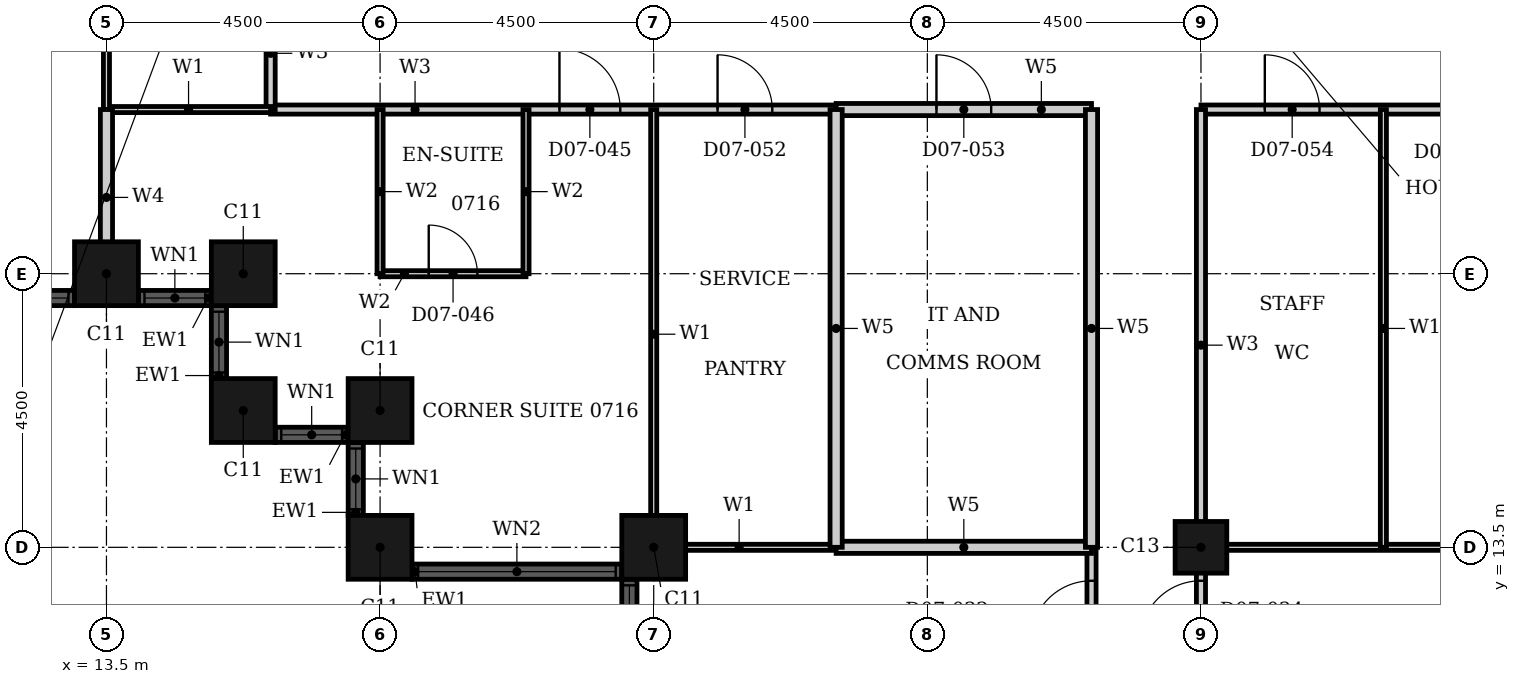
"""IFC4 building model, lengths in metres.
Left out: names, types, materials, properties, quantities, classifications, styles, units other than length and angle.
Written with IfcOpenShell. Run it as: python <this file> out.ifc"""

import sys

from ifc_helpers import new_model, si_unit, direction, frame, frame_2d, origin, origin_2d, place, context, subcontext, project, spatial, rectangle, hollow_rectangle, extrude, element, fill, save


model = new_model("IFC4")
c1 = context("Model", 3, precision=1e-05, world=origin(), true_north=direction((0.0, 1.0)))
c2 = subcontext(c1, "Body", "Model", "MODEL_VIEW")
j1 = project(units=[si_unit("LENGTHUNIT", "METRE"), si_unit("PLANEANGLEUNIT", "RADIAN")], contexts=[c1])
p1 = place(None, origin())
s1 = spatial("IfcSite", under=j1, at=p1, CompositionType="ELEMENT")
p2 = place(p1, origin())
s2 = spatial("IfcBuilding", under=s1, at=p2, CompositionType="ELEMENT")
p3 = place(p2, frame((0.0, 0.0, 37.2)))
s3 = spatial("IfcBuildingStorey", under=s2, at=p3, CompositionType="ELEMENT", Elevation=37.2)
for number, where, z_axis, x_axis in (
    (1, (13.5, 18.0, 0.0), (0.0, 0.0, 1.0), (1.0, 0.0, 0.0)),
    (2, (15.75, 18.0, 0.0), (0.0, 0.0, 1.0), (1.0, 0.0, 0.0)),
    (3, (15.75, 15.75, 0.0), (0.0, 0.0, 1.0), (1.0, 0.0, 0.0)),
    (4, (18.0, 15.75, 0.0), (0.0, 0.0, 1.0), (1.0, 0.0, 0.0)),
    (5, (18.0, 13.5, 0.0), (0.0, 0.0, 1.0), (1.0, 0.0, 0.0)),
    (6, (22.5, 13.5, 0.0), (0.0, 0.0, 1.0), (1.0, 0.0, 0.0)),
):
    element("IfcColumn", number, at=place(p3, frame(where, z_axis=z_axis, x_axis=x_axis)), inside=s3, PredefinedType="COLUMN", context=c2, shape_type="SweptSolid", body=[
        extrude(hollow_rectangle(XDim=1.05, YDim=1.05, WallThickness=0.034, at=origin_2d()), origin(), (0.0, 0.0, 1.0), 3.6),
    ])
p4 = place(p3, frame((31.5, 13.5, 0.0), z_axis=(0.0, 0.0, 1.0), x_axis=(1.0, 0.0, 0.0)))
e7 = element("IfcColumn", 7, at=p4, inside=s3, PredefinedType="COLUMN", context=c2, shape_type="SweptSolid", body=[
    extrude(hollow_rectangle(XDim=0.85, YDim=0.85, WallThickness=0.026, at=origin_2d()), origin(), (0.0, 0.0, 1.0), 3.6),
])
p5 = place(p3, frame((5.025, 17.6, 0.0), z_axis=(0.0, 0.0, 1.0), x_axis=(1.0, 0.0, 0.0)))
e8 = element("IfcWall", 8, at=p5, inside=s3, PredefinedType="SOLIDWALL", context=c2, shape_type="SweptSolid", body=[
    extrude(rectangle(XDim=7.95, YDim=0.25, at=frame_2d((3.975, 0.0))), origin(), (0.0, 0.0, 1.0), 3.6),
])
p6 = place(p5, frame((0.1, 0.0, 0.9)))
e9 = element("IfcOpeningElement", 9, at=p6, cuts=e8, PredefinedType="OPENING", context=c2, shape_type="SweptSolid", body=[
    extrude(rectangle(XDim=3.25, YDim=2.08, at=frame_2d((1.625, 1.04))), frame((0.0, 0.135, 0.0), z_axis=(0.0, -1.0, 0.0), x_axis=(1.0, 0.0, 0.0)), (0.0, 0.0, 1.0), 0.27),
])
p7 = place(p5, frame((4.6, 0.0, 0.9)))
e10 = element("IfcOpeningElement", 10, at=p7, cuts=e8, PredefinedType="OPENING", context=c2, shape_type="SweptSolid", body=[
    extrude(rectangle(XDim=3.25, YDim=2.08, at=frame_2d((1.625, 1.04))), frame((0.0, 0.135, 0.0), z_axis=(0.0, -1.0, 0.0), x_axis=(1.0, 0.0, 0.0)), (0.0, 0.0, 1.0), 0.27),
])
p8 = place(p3, frame((14.025, 17.6, 0.0), z_axis=(0.0, 0.0, 1.0), x_axis=(1.0, 0.0, 0.0)))
e11 = element("IfcWall", 11, at=p8, inside=s3, PredefinedType="SOLIDWALL", context=c2, shape_type="SweptSolid", body=[
    extrude(rectangle(XDim=1.2, YDim=0.25, at=frame_2d((0.6, 0.0))), origin(), (0.0, 0.0, 1.0), 3.6),
])
p9 = place(p8, frame((0.1, 0.0, 0.9)))
e12 = element("IfcOpeningElement", 12, at=p9, cuts=e11, PredefinedType="OPENING", context=c2, shape_type="SweptSolid", body=[
    extrude(rectangle(XDim=1.0, YDim=2.08, at=frame_2d((0.5, 1.04))), frame((0.0, 0.135, 0.0), z_axis=(0.0, -1.0, 0.0), x_axis=(1.0, 0.0, 0.0)), (0.0, 0.0, 1.0), 0.27),
])
p10 = place(p3, frame((15.35, 17.475, 0.0), z_axis=(0.0, 0.0, 1.0), x_axis=(0.0, -1.0, 0.0)))
e13 = element("IfcWall", 13, at=p10, inside=s3, PredefinedType="SOLIDWALL", context=c2, shape_type="SweptSolid", body=[
    extrude(rectangle(XDim=1.2, YDim=0.25, at=frame_2d((0.6, 0.0))), origin(), (0.0, 0.0, 1.0), 3.6),
])
p11 = place(p10, frame((0.1, 0.0, 0.9)))
e14 = element("IfcOpeningElement", 14, at=p11, cuts=e13, PredefinedType="OPENING", context=c2, shape_type="SweptSolid", body=[
    extrude(rectangle(XDim=1.0, YDim=2.08, at=frame_2d((0.5, 1.04))), frame((0.0, 0.135, 0.0), z_axis=(0.0, -1.0, 0.0), x_axis=(1.0, 0.0, 0.0)), (0.0, 0.0, 1.0), 0.27),
])
p12 = place(p3, frame((16.275, 15.35, 0.0), z_axis=(0.0, 0.0, 1.0), x_axis=(1.0, 0.0, 0.0)))
e15 = element("IfcWall", 15, at=p12, inside=s3, PredefinedType="SOLIDWALL", context=c2, shape_type="SweptSolid", body=[
    extrude(rectangle(XDim=1.2, YDim=0.25, at=frame_2d((0.6, 0.0))), origin(), (0.0, 0.0, 1.0), 3.6),
])
p13 = place(p12, frame((0.1, 0.0, 0.9)))
e16 = element("IfcOpeningElement", 16, at=p13, cuts=e15, PredefinedType="OPENING", context=c2, shape_type="SweptSolid", body=[
    extrude(rectangle(XDim=1.0, YDim=2.08, at=frame_2d((0.5, 1.04))), frame((0.0, 0.135, 0.0), z_axis=(0.0, -1.0, 0.0), x_axis=(1.0, 0.0, 0.0)), (0.0, 0.0, 1.0), 0.27),
])
p14 = place(p3, frame((17.6, 15.225, 0.0), z_axis=(0.0, 0.0, 1.0), x_axis=(0.0, -1.0, 0.0)))
e17 = element("IfcWall", 17, at=p14, inside=s3, PredefinedType="SOLIDWALL", context=c2, shape_type="SweptSolid", body=[
    extrude(rectangle(XDim=1.2, YDim=0.25, at=frame_2d((0.6, 0.0))), origin(), (0.0, 0.0, 1.0), 3.6),
])
p15 = place(p14, frame((0.1, 0.0, 0.9)))
e18 = element("IfcOpeningElement", 18, at=p15, cuts=e17, PredefinedType="OPENING", context=c2, shape_type="SweptSolid", body=[
    extrude(rectangle(XDim=1.0, YDim=2.08, at=frame_2d((0.5, 1.04))), frame((0.0, 0.135, 0.0), z_axis=(0.0, -1.0, 0.0), x_axis=(1.0, 0.0, 0.0)), (0.0, 0.0, 1.0), 0.27),
])
p16 = place(p3, frame((18.525, 13.1, 0.0), z_axis=(0.0, 0.0, 1.0), x_axis=(1.0, 0.0, 0.0)))
e19 = element("IfcWall", 19, at=p16, inside=s3, PredefinedType="SOLIDWALL", context=c2, shape_type="SweptSolid", body=[
    extrude(rectangle(XDim=3.45, YDim=0.25, at=frame_2d((1.725, 0.0))), origin(), (0.0, 0.0, 1.0), 3.6),
])
p17 = place(p16, frame((0.1, 0.0, 0.9)))
e20 = element("IfcOpeningElement", 20, at=p17, cuts=e19, PredefinedType="OPENING", context=c2, shape_type="SweptSolid", body=[
    extrude(rectangle(XDim=3.25, YDim=2.08, at=frame_2d((1.625, 1.04))), frame((0.0, 0.135, 0.0), z_axis=(0.0, -1.0, 0.0), x_axis=(1.0, 0.0, 0.0)), (0.0, 0.0, 1.0), 0.27),
])
p18 = place(p3, frame((22.1, 12.975, 0.0), z_axis=(0.0, 0.0, 1.0), x_axis=(0.0, -1.0, 0.0)))
e21 = element("IfcWall", 21, at=p18, inside=s3, PredefinedType="SOLIDWALL", context=c2, shape_type="SweptSolid", body=[
    extrude(rectangle(XDim=7.95, YDim=0.25, at=frame_2d((3.975, 0.0))), origin(), (0.0, 0.0, 1.0), 3.6),
])
p19 = place(p18, frame((0.1, 0.0, 0.9)))
e22 = element("IfcOpeningElement", 22, at=p19, cuts=e21, PredefinedType="OPENING", context=c2, shape_type="SweptSolid", body=[
    extrude(rectangle(XDim=3.25, YDim=2.08, at=frame_2d((1.625, 1.04))), frame((0.0, 0.135, 0.0), z_axis=(0.0, -1.0, 0.0), x_axis=(1.0, 0.0, 0.0)), (0.0, 0.0, 1.0), 0.27),
])
p20 = place(p18, frame((4.6, 0.0, 0.9)))
e23 = element("IfcOpeningElement", 23, at=p20, cuts=e21, PredefinedType="OPENING", context=c2, shape_type="SweptSolid", body=[
    extrude(rectangle(XDim=3.25, YDim=2.08, at=frame_2d((1.625, 1.04))), frame((0.0, 0.135, 0.0), z_axis=(0.0, -1.0, 0.0), x_axis=(1.0, 0.0, 0.0)), (0.0, 0.0, 1.0), 0.27),
])
p21 = place(p3, frame((16.2, 20.7, 0.0), z_axis=(0.0, 0.0, 1.0), x_axis=(1.0, 0.0, 0.0)))
e24 = element("IfcWall", 24, at=p21, inside=s3, PredefinedType="PARTITIONING", context=c2, shape_type="SweptSolid", body=[
    extrude(rectangle(XDim=9.3, YDim=0.15, at=frame_2d((4.65, 0.0))), origin(), (0.0, 0.0, 1.0), 3.3),
])
p22 = place(p21, frame((4.75, 0.0, 0.0)))
e25 = element("IfcOpeningElement", 25, at=p22, cuts=e24, PredefinedType="OPENING", context=c2, shape_type="SweptSolid", body=[
    extrude(rectangle(XDim=1.0, YDim=2.1, at=frame_2d((0.5, 1.05))), frame((0.0, 0.085, 0.0), z_axis=(0.0, -1.0, 0.0), x_axis=(1.0, 0.0, 0.0)), (0.0, 0.0, 1.0), 0.17),
])
p23 = place(p21, frame((7.35, 0.0, 0.0)))
e26 = element("IfcOpeningElement", 26, at=p23, cuts=e24, PredefinedType="OPENING", context=c2, shape_type="SweptSolid", body=[
    extrude(rectangle(XDim=0.9, YDim=2.1, at=frame_2d((0.45, 1.05))), frame((0.0, 0.085, 0.0), z_axis=(0.0, -1.0, 0.0), x_axis=(1.0, 0.0, 0.0)), (0.0, 0.0, 1.0), 0.17),
])
p24 = place(p3, frame((31.5, 20.7, 0.0), z_axis=(0.0, 0.0, 1.0), x_axis=(1.0, 0.0, 0.0)))
e27 = element("IfcWall", 27, at=p24, inside=s3, PredefinedType="PARTITIONING", context=c2, shape_type="SweptSolid", body=[
    extrude(rectangle(XDim=15.3, YDim=0.15, at=frame_2d((7.65, 0.0))), origin(), (0.0, 0.0, 1.0), 3.3),
])
p25 = place(p24, frame((11.95, 0.0, 0.0)))
e28 = element("IfcOpeningElement", 28, at=p25, cuts=e27, PredefinedType="OPENING", context=c2, shape_type="SweptSolid", body=[
    extrude(rectangle(XDim=1.0, YDim=2.1, at=frame_2d((0.5, 1.05))), frame((0.0, 0.085, 0.0), z_axis=(0.0, -1.0, 0.0), x_axis=(1.0, 0.0, 0.0)), (0.0, 0.0, 1.0), 0.17),
])
p26 = place(p24, frame((1.05, 0.0, 0.0)))
e29 = element("IfcOpeningElement", 29, at=p26, cuts=e27, PredefinedType="OPENING", context=c2, shape_type="SweptSolid", body=[
    extrude(rectangle(XDim=0.9, YDim=2.1, at=frame_2d((0.45, 1.05))), frame((0.0, 0.085, 0.0), z_axis=(0.0, -1.0, 0.0), x_axis=(1.0, 0.0, 0.0)), (0.0, 0.0, 1.0), 0.17),
])
p27 = place(p24, frame((5.55, 0.0, 0.0)))
e30 = element("IfcOpeningElement", 30, at=p27, cuts=e27, PredefinedType="OPENING", context=c2, shape_type="SweptSolid", body=[
    extrude(rectangle(XDim=0.9, YDim=2.1, at=frame_2d((0.45, 1.05))), frame((0.0, 0.085, 0.0), z_axis=(0.0, -1.0, 0.0), x_axis=(1.0, 0.0, 0.0)), (0.0, 0.0, 1.0), 0.17),
])
p28 = place(p3, frame((16.2, 20.7, 0.0), z_axis=(0.0, 0.0, 1.0), x_axis=(0.0, 1.0, 0.0)))
e31 = element("IfcWall", 31, at=p28, inside=s3, PredefinedType="PARTITIONING", context=c2, shape_type="SweptSolid", body=[
    extrude(rectangle(XDim=4.5, YDim=0.15, at=frame_2d((2.25, 0.0))), origin(), (0.0, 0.0, 1.0), 3.3),
])
p29 = place(p28, frame((1.85, 0.0, 0.0)))
e32 = element("IfcOpeningElement", 32, at=p29, cuts=e31, PredefinedType="OPENING", context=c2, shape_type="SweptSolid", body=[
    extrude(rectangle(XDim=0.9, YDim=2.1, at=frame_2d((0.45, 1.05))), frame((0.0, 0.085, 0.0), z_axis=(0.0, -1.0, 0.0), x_axis=(1.0, 0.0, 0.0)), (0.0, 0.0, 1.0), 0.17),
])
p30 = place(p3, frame((29.7, 9.0, 0.0), z_axis=(0.0, 0.0, 1.0), x_axis=(0.0, 1.0, 0.0)))
e33 = element("IfcWall", 33, at=p30, inside=s3, PredefinedType="PARTITIONING", context=c2, shape_type="SweptSolid", body=[
    extrude(rectangle(XDim=4.5, YDim=0.15, at=frame_2d((2.25, 0.0))), origin(), (0.0, 0.0, 1.0), 3.3),
])
p31 = place(p30, frame((2.95, 0.0, 0.0)))
e34 = element("IfcOpeningElement", 34, at=p31, cuts=e33, PredefinedType="OPENING", context=c2, shape_type="SweptSolid", body=[
    extrude(rectangle(XDim=1.0, YDim=2.1, at=frame_2d((0.5, 1.05))), frame((0.0, 0.085, 0.0), z_axis=(0.0, -1.0, 0.0), x_axis=(1.0, 0.0, 0.0)), (0.0, 0.0, 1.0), 0.17),
])
p32 = place(p3, frame((31.5, 9.0, 0.0), z_axis=(0.0, 0.0, 1.0), x_axis=(0.0, 1.0, 0.0)))
e35 = element("IfcWall", 35, at=p32, inside=s3, PredefinedType="PARTITIONING", context=c2, shape_type="SweptSolid", body=[
    extrude(rectangle(XDim=11.7, YDim=0.15, at=frame_2d((5.85, 0.0))), origin(), (0.0, 0.0, 1.0), 2.58),
])
p33 = place(p32, frame((2.95, 0.0, 0.0)))
e36 = element("IfcOpeningElement", 36, at=p33, cuts=e35, PredefinedType="OPENING", context=c2, shape_type="SweptSolid", body=[
    extrude(rectangle(XDim=1.0, YDim=2.1, at=frame_2d((0.5, 1.05))), frame((0.0, 0.085, 0.0), z_axis=(0.0, -1.0, 0.0), x_axis=(1.0, 0.0, 0.0)), (0.0, 0.0, 1.0), 0.17),
])
p34 = place(p3, frame((31.5, 13.5, 0.0), z_axis=(0.0, 0.0, 1.0), x_axis=(1.0, 0.0, 0.0)))
e37 = element("IfcWall", 37, at=p34, inside=s3, PredefinedType="PARTITIONING", context=c2, shape_type="SweptSolid", body=[
    extrude(rectangle(XDim=9.19, YDim=0.1, at=frame_2d((4.595, 0.0))), origin(), (0.0, 0.0, 1.0), 2.38),
])
p35 = place(p3, frame((22.31, 13.5, 0.0), z_axis=(0.0, 0.0, 1.0), x_axis=(1.0, 0.0, 0.0)))
e38 = element("IfcWall", 38, at=p35, inside=s3, PredefinedType="PARTITIONING", context=c2, shape_type="SweptSolid", body=[
    extrude(rectangle(XDim=3.19, YDim=0.1, at=frame_2d((1.595, 0.0))), origin(), (0.0, 0.0, 1.0), 2.38),
])
p36 = place(p3, frame((13.5, 20.7, 0.0), z_axis=(0.0, 0.0, 1.0), x_axis=(1.0, 0.0, 0.0)))
e39 = element("IfcWall", 39, at=p36, inside=s3, PredefinedType="PARTITIONING", context=c2, shape_type="SweptSolid", body=[
    extrude(rectangle(XDim=2.7, YDim=0.1, at=frame_2d((1.35, 0.0))), origin(), (0.0, 0.0, 1.0), 3.3),
])
p37 = place(p3, frame((13.5, 20.7, 0.0), z_axis=(0.0, 0.0, 1.0), x_axis=(0.0, 1.0, 0.0)))
e40 = element("IfcWall", 40, at=p37, inside=s3, PredefinedType="PARTITIONING", context=c2, shape_type="SweptSolid", body=[
    extrude(rectangle(XDim=4.5, YDim=0.1, at=frame_2d((2.25, 0.0))), origin(), (0.0, 0.0, 1.0), 2.38),
])
p38 = place(p3, frame((22.5, 13.31, 0.0), z_axis=(0.0, 0.0, 1.0), x_axis=(0.0, 1.0, 0.0)))
e41 = element("IfcWall", 41, at=p38, inside=s3, PredefinedType="PARTITIONING", context=c2, shape_type="SweptSolid", body=[
    extrude(rectangle(XDim=7.39, YDim=0.1, at=frame_2d((3.695, 0.0))), origin(), (0.0, 0.0, 1.0), 3.3),
])
p39 = place(p3, frame((34.5, 13.5, 0.0), z_axis=(0.0, 0.0, 1.0), x_axis=(0.0, 1.0, 0.0)))
e42 = element("IfcWall", 42, at=p39, inside=s3, PredefinedType="PARTITIONING", context=c2, shape_type="SweptSolid", body=[
    extrude(rectangle(XDim=7.2, YDim=0.1, at=frame_2d((3.6, 0.0))), origin(), (0.0, 0.0, 1.0), 3.3),
])
p40 = place(p3, frame((13.5, 17.81, 0.0), z_axis=(0.0, 0.0, 1.0), x_axis=(0.0, 1.0, 0.0)))
e43 = element("IfcWall", 43, at=p40, inside=s3, PredefinedType="PARTITIONING", context=c2, shape_type="SweptSolid", body=[
    extrude(rectangle(XDim=2.89, YDim=0.2, at=frame_2d((1.445, 0.0))), origin(), (0.0, 0.0, 1.0), 2.38),
])
p41 = place(p3, frame((18.0, 18.0, 0.0), z_axis=(0.0, 0.0, 1.0), x_axis=(1.0, 0.0, 0.0)))
e44 = element("IfcWall", 44, at=p41, inside=s3, PredefinedType="PARTITIONING", context=c2, shape_type="SweptSolid", body=[
    extrude(rectangle(XDim=2.4, YDim=0.1, at=frame_2d((1.2, 0.0))), origin(), (0.0, 0.0, 1.0), 3.3),
])
p42 = place(p41, frame((0.8, 0.0, 0.0)))
e45 = element("IfcOpeningElement", 45, at=p42, cuts=e44, PredefinedType="OPENING", context=c2, shape_type="SweptSolid", body=[
    extrude(rectangle(XDim=0.8, YDim=2.1, at=frame_2d((0.4, 1.05))), frame((0.0, 0.06, 0.0), z_axis=(0.0, -1.0, 0.0), x_axis=(1.0, 0.0, 0.0)), (0.0, 0.0, 1.0), 0.12),
])
for number, where, z_axis, x_axis in (
    (46, (18.0, 18.0, 0.0), (0.0, 0.0, 1.0), (0.0, 1.0, 0.0)),
    (47, (20.4, 18.0, 0.0), (0.0, 0.0, 1.0), (0.0, 1.0, 0.0)),
):
    element("IfcWall", number, at=place(p3, frame(where, z_axis=z_axis, x_axis=x_axis)), inside=s3, PredefinedType="PARTITIONING", context=c2, shape_type="SweptSolid", body=[
        extrude(rectangle(XDim=2.7, YDim=0.1, at=frame_2d((1.35, 0.0))), origin(), (0.0, 0.0, 1.0), 3.3),
    ])
p43 = place(p3, frame((25.5, 13.5, 0.0), z_axis=(0.0, 0.0, 1.0), x_axis=(1.0, 0.0, 0.0)))
e48 = element("IfcWall", 48, at=p43, inside=s3, PredefinedType="PARTITIONING", context=c2, shape_type="SweptSolid", body=[
    extrude(rectangle(XDim=4.2, YDim=0.2, at=frame_2d((2.1, 0.0))), origin(), (0.0, 0.0, 1.0), 2.38),
])
p44 = place(p3, frame((25.5, 20.7, 0.0), z_axis=(0.0, 0.0, 1.0), x_axis=(1.0, 0.0, 0.0)))
e49 = element("IfcWall", 49, at=p44, inside=s3, PredefinedType="PARTITIONING", context=c2, shape_type="SweptSolid", body=[
    extrude(rectangle(XDim=4.2, YDim=0.2, at=frame_2d((2.1, 0.0))), origin(), (0.0, 0.0, 1.0), 3.3),
])
p45 = place(p44, frame((1.65, 0.0, 0.0)))
e50 = element("IfcOpeningElement", 50, at=p45, cuts=e49, PredefinedType="OPENING", context=c2, shape_type="SweptSolid", body=[
    extrude(rectangle(XDim=0.9, YDim=2.1, at=frame_2d((0.45, 1.05))), frame((0.0, 0.11, 0.0), z_axis=(0.0, -1.0, 0.0), x_axis=(1.0, 0.0, 0.0)), (0.0, 0.0, 1.0), 0.22),
])
for number, where, z_axis, x_axis in (
    (51, (25.5, 13.5, 0.0), (0.0, 0.0, 1.0), (0.0, 1.0, 0.0)),
    (52, (29.7, 13.5, 0.0), (0.0, 0.0, 1.0), (0.0, 1.0, 0.0)),
):
    element("IfcWall", number, at=place(p3, frame(where, z_axis=z_axis, x_axis=x_axis)), inside=s3, PredefinedType="PARTITIONING", context=c2, shape_type="SweptSolid", body=[
        extrude(rectangle(XDim=7.2, YDim=0.2, at=frame_2d((3.6, 0.0))), origin(), (0.0, 0.0, 1.0), 3.3),
    ])
p46 = place(p7, origin())
e53 = element("IfcWindow", 53, at=p46, inside=s3, PartitioningType="SINGLE_PANEL", PredefinedType="WINDOW", context=c2, shape_type="SweptSolid", body=[
    extrude(rectangle(XDim=3.25, YDim=2.08, at=frame_2d((1.625, 1.04))), frame((0.0, 0.03, 0.0), z_axis=(0.0, -1.0, 0.0), x_axis=(1.0, 0.0, 0.0)), (0.0, 0.0, 1.0), 0.06),
])
fill(e10, e53)
p47 = place(p9, origin())
e54 = element("IfcWindow", 54, at=p47, inside=s3, PartitioningType="SINGLE_PANEL", PredefinedType="WINDOW", context=c2, shape_type="SweptSolid", body=[
    extrude(rectangle(XDim=1.0, YDim=2.08, at=frame_2d((0.5, 1.04))), frame((0.0, 0.03, 0.0), z_axis=(0.0, -1.0, 0.0), x_axis=(1.0, 0.0, 0.0)), (0.0, 0.0, 1.0), 0.06),
])
fill(e12, e54)
p48 = place(p11, origin())
e55 = element("IfcWindow", 55, at=p48, inside=s3, PartitioningType="SINGLE_PANEL", PredefinedType="WINDOW", context=c2, shape_type="SweptSolid", body=[
    extrude(rectangle(XDim=1.0, YDim=2.08, at=frame_2d((0.5, 1.04))), frame((0.0, 0.03, 0.0), z_axis=(0.0, -1.0, 0.0), x_axis=(1.0, 0.0, 0.0)), (0.0, 0.0, 1.0), 0.06),
])
fill(e14, e55)
p49 = place(p13, origin())
e56 = element("IfcWindow", 56, at=p49, inside=s3, PartitioningType="SINGLE_PANEL", PredefinedType="WINDOW", context=c2, shape_type="SweptSolid", body=[
    extrude(rectangle(XDim=1.0, YDim=2.08, at=frame_2d((0.5, 1.04))), frame((0.0, 0.03, 0.0), z_axis=(0.0, -1.0, 0.0), x_axis=(1.0, 0.0, 0.0)), (0.0, 0.0, 1.0), 0.06),
])
fill(e16, e56)
p50 = place(p15, origin())
e57 = element("IfcWindow", 57, at=p50, inside=s3, PartitioningType="SINGLE_PANEL", PredefinedType="WINDOW", context=c2, shape_type="SweptSolid", body=[
    extrude(rectangle(XDim=1.0, YDim=2.08, at=frame_2d((0.5, 1.04))), frame((0.0, 0.03, 0.0), z_axis=(0.0, -1.0, 0.0), x_axis=(1.0, 0.0, 0.0)), (0.0, 0.0, 1.0), 0.06),
])
fill(e18, e57)
p51 = place(p17, origin())
e58 = element("IfcWindow", 58, at=p51, inside=s3, PartitioningType="SINGLE_PANEL", PredefinedType="WINDOW", context=c2, shape_type="SweptSolid", body=[
    extrude(rectangle(XDim=3.25, YDim=2.08, at=frame_2d((1.625, 1.04))), frame((0.0, 0.03, 0.0), z_axis=(0.0, -1.0, 0.0), x_axis=(1.0, 0.0, 0.0)), (0.0, 0.0, 1.0), 0.06),
])
fill(e20, e58)
p52 = place(p19, origin())
e59 = element("IfcWindow", 59, at=p52, inside=s3, PartitioningType="SINGLE_PANEL", PredefinedType="WINDOW", context=c2, shape_type="SweptSolid", body=[
    extrude(rectangle(XDim=3.25, YDim=2.08, at=frame_2d((1.625, 1.04))), frame((0.0, 0.03, 0.0), z_axis=(0.0, -1.0, 0.0), x_axis=(1.0, 0.0, 0.0)), (0.0, 0.0, 1.0), 0.06),
])
fill(e22, e59)
p53 = place(p31, origin())
e60 = element("IfcDoor", 60, at=p53, inside=s3, OperationType="SINGLE_SWING_RIGHT", PredefinedType="DOOR", context=c2, shape_type="SweptSolid", body=[
    extrude(rectangle(XDim=1.0, YDim=2.1, at=frame_2d((0.5, 1.05))), frame((0.0, 0.025, 0.0), z_axis=(0.0, -1.0, 0.0), x_axis=(1.0, 0.0, 0.0)), (0.0, 0.0, 1.0), 0.05),
])
fill(e34, e60)
p54 = place(p33, origin())
e61 = element("IfcDoor", 61, at=p54, inside=s3, OperationType="SINGLE_SWING_RIGHT", PredefinedType="DOOR", context=c2, shape_type="SweptSolid", body=[
    extrude(rectangle(XDim=1.0, YDim=2.1, at=frame_2d((0.5, 1.05))), frame((0.0, 0.025, 0.0), z_axis=(0.0, -1.0, 0.0), x_axis=(1.0, 0.0, 0.0)), (0.0, 0.0, 1.0), 0.05),
])
fill(e36, e61)
p55 = place(p22, origin())
e62 = element("IfcDoor", 62, at=p55, inside=s3, OperationType="SINGLE_SWING_RIGHT", PredefinedType="DOOR", context=c2, shape_type="SweptSolid", body=[
    extrude(rectangle(XDim=1.0, YDim=2.1, at=frame_2d((0.5, 1.05))), frame((0.0, 0.025, 0.0), z_axis=(0.0, -1.0, 0.0), x_axis=(1.0, 0.0, 0.0)), (0.0, 0.0, 1.0), 0.05),
])
fill(e25, e62)
p56 = place(p42, origin())
e63 = element("IfcDoor", 63, at=p56, inside=s3, OperationType="SINGLE_SWING_LEFT", PredefinedType="DOOR", context=c2, shape_type="SweptSolid", body=[
    extrude(rectangle(XDim=0.8, YDim=2.1, at=frame_2d((0.4, 1.05))), frame((0.0, 0.025, 0.0), z_axis=(0.0, -1.0, 0.0), x_axis=(1.0, 0.0, 0.0)), (0.0, 0.0, 1.0), 0.05),
])
fill(e45, e63)
p57 = place(p23, origin())
e64 = element("IfcDoor", 64, at=p57, inside=s3, OperationType="SINGLE_SWING_RIGHT", PredefinedType="DOOR", context=c2, shape_type="SweptSolid", body=[
    extrude(rectangle(XDim=0.9, YDim=2.1, at=frame_2d((0.45, 1.05))), frame((0.0, 0.025, 0.0), z_axis=(0.0, -1.0, 0.0), x_axis=(1.0, 0.0, 0.0)), (0.0, 0.0, 1.0), 0.05),
])
fill(e26, e64)
p58 = place(p45, origin())
e65 = element("IfcDoor", 65, at=p58, inside=s3, OperationType="SINGLE_SWING_LEFT", PredefinedType="DOOR", context=c2, shape_type="SweptSolid", body=[
    extrude(rectangle(XDim=0.9, YDim=2.1, at=frame_2d((0.45, 1.05))), frame((0.0, 0.025, 0.0), z_axis=(0.0, -1.0, 0.0), x_axis=(1.0, 0.0, 0.0)), (0.0, 0.0, 1.0), 0.05),
])
fill(e50, e65)
p59 = place(p26, origin())
e66 = element("IfcDoor", 66, at=p59, inside=s3, OperationType="SINGLE_SWING_LEFT", PredefinedType="DOOR", context=c2, shape_type="SweptSolid", body=[
    extrude(rectangle(XDim=0.9, YDim=2.1, at=frame_2d((0.45, 1.05))), frame((0.0, 0.025, 0.0), z_axis=(0.0, -1.0, 0.0), x_axis=(1.0, 0.0, 0.0)), (0.0, 0.0, 1.0), 0.05),
])
fill(e29, e66)
save(model, sys.argv[1])
